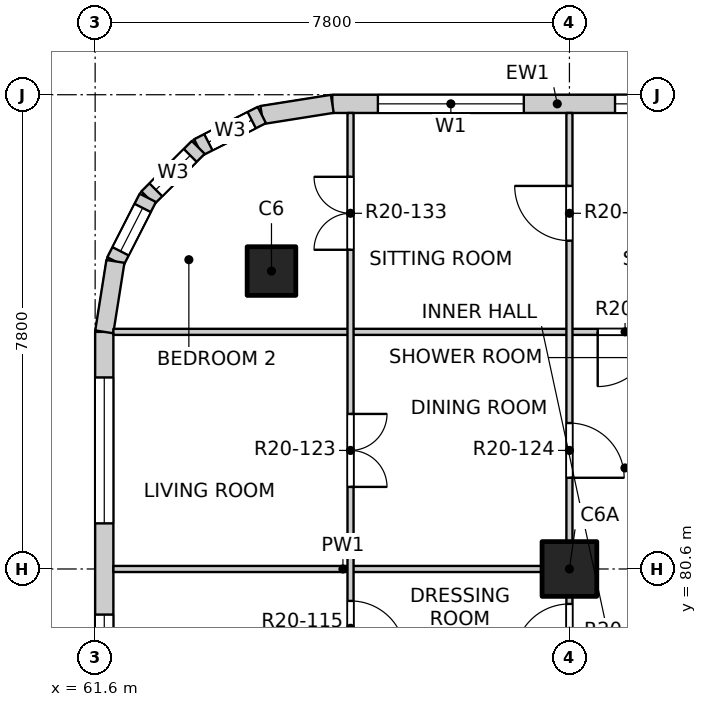
"""IFC4 building model, lengths in metres.
Left out: names, types, materials, properties, quantities, classifications, styles, units other than length and angle.
Written with IfcOpenShell. Run it as: python <this file> out.ifc"""

import sys

from ifc_helpers import new_model, si_unit, direction, frame, frame_2d, origin, origin_2d, place, context, subcontext, project, spatial, rectangle, extrude, element, fill, save


model = new_model("IFC4")
c1 = context("Model", 3, precision=1e-05, world=origin(), true_north=direction((0.0, 1.0)))
c2 = subcontext(c1, "Body", "Model", "MODEL_VIEW")
j1 = project(units=[si_unit("LENGTHUNIT", "METRE"), si_unit("PLANEANGLEUNIT", "RADIAN")], contexts=[c1])
p1 = place(None, origin())
s1 = spatial("IfcSite", under=j1, at=p1, CompositionType="ELEMENT")
p2 = place(p1, origin())
s2 = spatial("IfcBuilding", under=s1, at=p2, CompositionType="ELEMENT")
p3 = place(p2, frame((0.0, 0.0, 204.1)))
s3 = spatial("IfcBuildingStorey", under=s2, at=p3, CompositionType="ELEMENT", Elevation=204.1)
p4 = place(p3, frame((64.5, 85.5, -0.25), z_axis=(0.0, 0.0, 1.0), x_axis=(1.0, 0.0, 0.0)))
e1 = element("IfcColumn", 1, at=p4, inside=s3, PredefinedType="COLUMN", context=c2, shape_type="SweptSolid", body=[
    extrude(rectangle(XDim=0.8, YDim=0.8, at=origin_2d()), origin(), (0.0, 0.0, 1.0), 3.4),
])
p5 = place(p3, frame((69.4, 80.6, -0.25), z_axis=(0.0, 0.0, 1.0), x_axis=(1.0, 0.0, 0.0)))
e2 = element("IfcColumn", 2, at=p5, inside=s3, PredefinedType="COLUMN", context=c2, shape_type="SweptSolid", body=[
    extrude(rectangle(XDim=0.9, YDim=0.9, at=origin_2d()), origin(), (0.0, 0.0, 1.0), 3.4),
])
p6 = place(p3, frame((65.5, 88.25, 0.0), z_axis=(0.0, 0.0, 1.0), x_axis=(1.0, 0.0, 0.0)))
e3 = element("IfcWall", 3, at=p6, inside=s3, PredefinedType="SOLIDWALL", context=c2, shape_type="SweptSolid", body=[
    extrude(rectangle(XDim=7.4, YDim=0.3, at=frame_2d((3.7, 0.0))), origin(), (0.0, 0.0, 1.0), 2.7),
])
p7 = place(p6, frame((0.75, 0.0, 0.9)))
e4 = element("IfcOpeningElement", 4, at=p7, cuts=e3, PredefinedType="OPENING", context=c2, shape_type="SweptSolid", body=[
    extrude(rectangle(XDim=2.4, YDim=1.8, at=frame_2d((1.2, 0.9))), frame((0.0, 0.16, 0.0), z_axis=(0.0, -1.0, 0.0), x_axis=(1.0, 0.0, 0.0)), (0.0, 0.0, 1.0), 0.32),
])
p8 = place(p6, frame((4.65, 0.0, 0.9)))
e5 = element("IfcOpeningElement", 5, at=p8, cuts=e3, PredefinedType="OPENING", context=c2, shape_type="SweptSolid", body=[
    extrude(rectangle(XDim=2.4, YDim=1.8, at=frame_2d((1.2, 0.9))), frame((0.0, 0.16, 0.0), z_axis=(0.0, -1.0, 0.0), x_axis=(1.0, 0.0, 0.0)), (0.0, 0.0, 1.0), 0.32),
])
p9 = place(p3, frame((61.75, 77.1, 0.0), z_axis=(0.0, 0.0, 1.0), x_axis=(0.0, 1.0, 0.0)))
e6 = element("IfcWall", 6, at=p9, inside=s3, PredefinedType="SOLIDWALL", context=c2, shape_type="SweptSolid", body=[
    extrude(rectangle(XDim=7.4, YDim=0.3, at=frame_2d((3.7, 0.0))), origin(), (0.0, 0.0, 1.0), 2.7),
])
p10 = place(p9, frame((0.35, 0.0, 0.9)))
e7 = element("IfcOpeningElement", 7, at=p10, cuts=e6, PredefinedType="OPENING", context=c2, shape_type="SweptSolid", body=[
    extrude(rectangle(XDim=2.4, YDim=1.8, at=frame_2d((1.2, 0.9))), frame((0.0, 0.16, 0.0), z_axis=(0.0, -1.0, 0.0), x_axis=(1.0, 0.0, 0.0)), (0.0, 0.0, 1.0), 0.32),
])
p11 = place(p9, frame((4.25, 0.0, 0.9)))
e8 = element("IfcOpeningElement", 8, at=p11, cuts=e6, PredefinedType="OPENING", context=c2, shape_type="SweptSolid", body=[
    extrude(rectangle(XDim=2.4, YDim=1.8, at=frame_2d((1.2, 0.9))), frame((0.0, 0.16, 0.0), z_axis=(0.0, -1.0, 0.0), x_axis=(1.0, 0.0, 0.0)), (0.0, 0.0, 1.0), 0.32),
])
p12 = place(p3, frame((65.5, 88.25, 0.0), z_axis=(0.0, 0.0, 1.0), x_axis=(-0.987678452879, -0.156496880861, 0.0)))
e9 = element("IfcWall", 9, at=p12, inside=s3, PredefinedType="SOLIDWALL", context=c2, shape_type="SweptSolid", body=[
    extrude(rectangle(XDim=1.173, YDim=0.3, at=frame_2d((0.586, 0.0))), origin(), (0.0, 0.0, 1.0), 2.7),
])
p13 = place(p3, frame((64.341, 88.066, 0.0), z_axis=(0.0, 0.0, 1.0), x_axis=(-0.890988677504, -0.454025524128, 0.0)))
e10 = element("IfcWall", 10, at=p13, inside=s3, PredefinedType="SOLIDWALL", context=c2, shape_type="SweptSolid", body=[
    extrude(rectangle(XDim=1.173, YDim=0.3, at=frame_2d((0.587, 0.0))), origin(), (0.0, 0.0, 1.0), 2.7),
])
p14 = place(p13, frame((0.187, 0.0, 0.9)))
e11 = element("IfcOpeningElement", 11, at=p14, cuts=e10, PredefinedType="OPENING", context=c2, shape_type="SweptSolid", body=[
    extrude(rectangle(XDim=0.8, YDim=1.2, at=frame_2d((0.4, 0.6))), frame((0.0, 0.16, 0.0), z_axis=(0.0, -1.0, 0.0), x_axis=(1.0, 0.0, 0.0)), (0.0, 0.0, 1.0), 0.32),
])
p15 = place(p3, frame((63.296, 87.534, 0.0), z_axis=(0.0, 0.0, 1.0), x_axis=(-0.707106781187, -0.707106781187, 0.0)))
e12 = element("IfcWall", 12, at=p15, inside=s3, PredefinedType="SOLIDWALL", context=c2, shape_type="SweptSolid", body=[
    extrude(rectangle(XDim=1.173, YDim=0.3, at=frame_2d((0.586, 0.0))), origin(), (0.0, 0.0, 1.0), 2.7),
])
p16 = place(p15, frame((0.187, 0.0, 0.9)))
e13 = element("IfcOpeningElement", 13, at=p16, cuts=e12, PredefinedType="OPENING", context=c2, shape_type="SweptSolid", body=[
    extrude(rectangle(XDim=0.8, YDim=1.2, at=frame_2d((0.4, 0.6))), frame((0.0, 0.16, 0.0), z_axis=(0.0, -1.0, 0.0), x_axis=(1.0, 0.0, 0.0)), (0.0, 0.0, 1.0), 0.32),
])
p17 = place(p3, frame((62.466, 86.704, 0.0), z_axis=(0.0, 0.0, 1.0), x_axis=(-0.454025524128, -0.890988677504, 0.0)))
e14 = element("IfcWall", 14, at=p17, inside=s3, PredefinedType="SOLIDWALL", context=c2, shape_type="SweptSolid", body=[
    extrude(rectangle(XDim=1.173, YDim=0.3, at=frame_2d((0.587, 0.0))), origin(), (0.0, 0.0, 1.0), 2.7),
])
p18 = place(p17, frame((0.187, 0.0, 0.9)))
e15 = element("IfcOpeningElement", 15, at=p18, cuts=e14, PredefinedType="OPENING", context=c2, shape_type="SweptSolid", body=[
    extrude(rectangle(XDim=0.8, YDim=1.2, at=frame_2d((0.4, 0.6))), frame((0.0, 0.16, 0.0), z_axis=(0.0, -1.0, 0.0), x_axis=(1.0, 0.0, 0.0)), (0.0, 0.0, 1.0), 0.32),
])
p19 = place(p3, frame((61.934, 85.659, 0.0), z_axis=(0.0, 0.0, 1.0), x_axis=(-0.156496880861, -0.987678452879, 0.0)))
e16 = element("IfcWall", 16, at=p19, inside=s3, PredefinedType="SOLIDWALL", context=c2, shape_type="SweptSolid", body=[
    extrude(rectangle(XDim=1.173, YDim=0.3, at=frame_2d((0.586, 0.0))), origin(), (0.0, 0.0, 1.0), 2.7),
])
p20 = place(p3, frame((61.9, 80.6, 0.0), z_axis=(0.0, 0.0, 1.0), x_axis=(1.0, 0.0, 0.0)))
e17 = element("IfcWall", 17, at=p20, inside=s3, PredefinedType="PARTITIONING", context=c2, shape_type="SweptSolid", body=[
    extrude(rectangle(XDim=7.55, YDim=0.1, at=frame_2d((3.775, 0.0))), origin(), (0.0, 0.0, 1.0), 3.15),
])
p21 = place(p3, frame((61.9, 84.5, 0.0), z_axis=(0.0, 0.0, 1.0), x_axis=(1.0, 0.0, 0.0)))
e18 = element("IfcWall", 18, at=p21, inside=s3, PredefinedType="PARTITIONING", context=c2, shape_type="SweptSolid", body=[
    extrude(rectangle(XDim=11.5, YDim=0.1, at=frame_2d((5.75, 0.0))), origin(), (0.0, 0.0, 1.0), 3.15),
])
p22 = place(p21, frame((7.965, 0.0, 0.0)))
e19 = element("IfcOpeningElement", 19, at=p22, cuts=e18, PredefinedType="OPENING", context=c2, shape_type="SweptSolid", body=[
    extrude(rectangle(XDim=0.9, YDim=2.1, at=frame_2d((0.45, 1.05))), frame((0.0, 0.06, 0.0), z_axis=(0.0, -1.0, 0.0), x_axis=(1.0, 0.0, 0.0)), (0.0, 0.0, 1.0), 0.12),
])
p23 = place(p3, frame((65.8, 61.2, 0.0), z_axis=(0.0, 0.0, 1.0), x_axis=(0.0, 1.0, 0.0)))
e20 = element("IfcWall", 20, at=p23, inside=s3, PredefinedType="PARTITIONING", context=c2, shape_type="SweptSolid", body=[
    extrude(rectangle(XDim=26.9, YDim=0.1, at=frame_2d((13.45, 0.0))), origin(), (0.0, 0.0, 1.0), 3.15),
])
p24 = place(p23, frame((0.425, 0.0, 0.0)))
e21 = element("IfcOpeningElement", 21, at=p24, cuts=e20, PredefinedType="OPENING", context=c2, shape_type="SweptSolid", body=[
    extrude(rectangle(XDim=0.9, YDim=2.1, at=frame_2d((0.45, 1.05))), frame((0.0, 0.06, 0.0), z_axis=(0.0, -1.0, 0.0), x_axis=(1.0, 0.0, 0.0)), (0.0, 0.0, 1.0), 0.12),
])
p25 = place(p23, frame((2.375, 0.0, 0.0)))
e22 = element("IfcOpeningElement", 22, at=p25, cuts=e20, PredefinedType="OPENING", context=c2, shape_type="SweptSolid", body=[
    extrude(rectangle(XDim=0.9, YDim=2.1, at=frame_2d((0.45, 1.05))), frame((0.0, 0.06, 0.0), z_axis=(0.0, -1.0, 0.0), x_axis=(1.0, 0.0, 0.0)), (0.0, 0.0, 1.0), 0.12),
])
p26 = place(p23, frame((5.15, 0.0, 0.0)))
e23 = element("IfcOpeningElement", 23, at=p26, cuts=e20, PredefinedType="OPENING", context=c2, shape_type="SweptSolid", body=[
    extrude(rectangle(XDim=1.2, YDim=2.1, at=frame_2d((0.6, 1.05))), frame((0.0, 0.06, 0.0), z_axis=(0.0, -1.0, 0.0), x_axis=(1.0, 0.0, 0.0)), (0.0, 0.0, 1.0), 0.12),
])
p27 = place(p23, frame((9.05, 0.0, 0.0)))
e24 = element("IfcOpeningElement", 24, at=p27, cuts=e20, PredefinedType="OPENING", context=c2, shape_type="SweptSolid", body=[
    extrude(rectangle(XDim=1.2, YDim=2.1, at=frame_2d((0.6, 1.05))), frame((0.0, 0.06, 0.0), z_axis=(0.0, -1.0, 0.0), x_axis=(1.0, 0.0, 0.0)), (0.0, 0.0, 1.0), 0.12),
])
p28 = place(p23, frame((12.125, 0.0, 0.0)))
e25 = element("IfcOpeningElement", 25, at=p28, cuts=e20, PredefinedType="OPENING", context=c2, shape_type="SweptSolid", body=[
    extrude(rectangle(XDim=0.9, YDim=2.1, at=frame_2d((0.45, 1.05))), frame((0.0, 0.06, 0.0), z_axis=(0.0, -1.0, 0.0), x_axis=(1.0, 0.0, 0.0)), (0.0, 0.0, 1.0), 0.12),
])
p29 = place(p23, frame((14.075, 0.0, 0.0)))
e26 = element("IfcOpeningElement", 26, at=p29, cuts=e20, PredefinedType="OPENING", context=c2, shape_type="SweptSolid", body=[
    extrude(rectangle(XDim=0.9, YDim=2.1, at=frame_2d((0.45, 1.05))), frame((0.0, 0.06, 0.0), z_axis=(0.0, -1.0, 0.0), x_axis=(1.0, 0.0, 0.0)), (0.0, 0.0, 1.0), 0.12),
])
p30 = place(p23, frame((16.025, 0.0, 0.0)))
e27 = element("IfcOpeningElement", 27, at=p30, cuts=e20, PredefinedType="OPENING", context=c2, shape_type="SweptSolid", body=[
    extrude(rectangle(XDim=0.9, YDim=2.1, at=frame_2d((0.45, 1.05))), frame((0.0, 0.06, 0.0), z_axis=(0.0, -1.0, 0.0), x_axis=(1.0, 0.0, 0.0)), (0.0, 0.0, 1.0), 0.12),
])
p31 = place(p23, frame((17.975, 0.0, 0.0)))
e28 = element("IfcOpeningElement", 28, at=p31, cuts=e20, PredefinedType="OPENING", context=c2, shape_type="SweptSolid", body=[
    extrude(rectangle(XDim=0.9, YDim=2.1, at=frame_2d((0.45, 1.05))), frame((0.0, 0.06, 0.0), z_axis=(0.0, -1.0, 0.0), x_axis=(1.0, 0.0, 0.0)), (0.0, 0.0, 1.0), 0.12),
])
p32 = place(p23, frame((20.75, 0.0, 0.0)))
e29 = element("IfcOpeningElement", 29, at=p32, cuts=e20, PredefinedType="OPENING", context=c2, shape_type="SweptSolid", body=[
    extrude(rectangle(XDim=1.2, YDim=2.1, at=frame_2d((0.6, 1.05))), frame((0.0, 0.06, 0.0), z_axis=(0.0, -1.0, 0.0), x_axis=(1.0, 0.0, 0.0)), (0.0, 0.0, 1.0), 0.12),
])
p33 = place(p23, frame((24.65, 0.0, 0.0)))
e30 = element("IfcOpeningElement", 30, at=p33, cuts=e20, PredefinedType="OPENING", context=c2, shape_type="SweptSolid", body=[
    extrude(rectangle(XDim=1.2, YDim=2.1, at=frame_2d((0.6, 1.05))), frame((0.0, 0.06, 0.0), z_axis=(0.0, -1.0, 0.0), x_axis=(1.0, 0.0, 0.0)), (0.0, 0.0, 1.0), 0.12),
])
p34 = place(p3, frame((69.4, 41.9, 0.0), z_axis=(0.0, 0.0, 1.0), x_axis=(0.0, 1.0, 0.0)))
e31 = element("IfcWall", 31, at=p34, inside=s3, PredefinedType="PARTITIONING", context=c2, shape_type="SweptSolid", body=[
    extrude(rectangle(XDim=46.2, YDim=0.1, at=frame_2d((23.1, 0.0))), origin(), (0.0, 0.0, 1.0), 3.15),
])
p35 = place(p34, frame((1.2, 0.0, 0.0)))
e32 = element("IfcOpeningElement", 32, at=p35, cuts=e31, PredefinedType="OPENING", context=c2, shape_type="SweptSolid", body=[
    extrude(rectangle(XDim=0.9, YDim=2.1, at=frame_2d((0.45, 1.05))), frame((0.0, 0.06, 0.0), z_axis=(0.0, -1.0, 0.0), x_axis=(1.0, 0.0, 0.0)), (0.0, 0.0, 1.0), 0.12),
])
p36 = place(p34, frame((5.1, 0.0, 0.0)))
e33 = element("IfcOpeningElement", 33, at=p36, cuts=e31, PredefinedType="OPENING", context=c2, shape_type="SweptSolid", body=[
    extrude(rectangle(XDim=0.9, YDim=2.1, at=frame_2d((0.45, 1.05))), frame((0.0, 0.06, 0.0), z_axis=(0.0, -1.0, 0.0), x_axis=(1.0, 0.0, 0.0)), (0.0, 0.0, 1.0), 0.12),
])
p37 = place(p34, frame((9.975, 0.0, 0.0)))
e34 = element("IfcOpeningElement", 34, at=p37, cuts=e31, PredefinedType="OPENING", context=c2, shape_type="SweptSolid", body=[
    extrude(rectangle(XDim=0.9, YDim=2.1, at=frame_2d((0.45, 1.05))), frame((0.0, 0.06, 0.0), z_axis=(0.0, -1.0, 0.0), x_axis=(1.0, 0.0, 0.0)), (0.0, 0.0, 1.0), 0.12),
])
p38 = place(p34, frame((12.9, 0.0, 0.0)))
e35 = element("IfcOpeningElement", 35, at=p38, cuts=e31, PredefinedType="OPENING", context=c2, shape_type="SweptSolid", body=[
    extrude(rectangle(XDim=0.9, YDim=2.1, at=frame_2d((0.45, 1.05))), frame((0.0, 0.06, 0.0), z_axis=(0.0, -1.0, 0.0), x_axis=(1.0, 0.0, 0.0)), (0.0, 0.0, 1.0), 0.12),
])
p39 = place(p34, frame((17.775, 0.0, 0.0)))
e36 = element("IfcOpeningElement", 36, at=p39, cuts=e31, PredefinedType="OPENING", context=c2, shape_type="SweptSolid", body=[
    extrude(rectangle(XDim=0.9, YDim=2.1, at=frame_2d((0.45, 1.05))), frame((0.0, 0.06, 0.0), z_axis=(0.0, -1.0, 0.0), x_axis=(1.0, 0.0, 0.0)), (0.0, 0.0, 1.0), 0.12),
])
p40 = place(p34, frame((21.625, 0.0, 0.0)))
e37 = element("IfcOpeningElement", 37, at=p40, cuts=e31, PredefinedType="OPENING", context=c2, shape_type="SweptSolid", body=[
    extrude(rectangle(XDim=0.9, YDim=2.1, at=frame_2d((0.45, 1.05))), frame((0.0, 0.06, 0.0), z_axis=(0.0, -1.0, 0.0), x_axis=(1.0, 0.0, 0.0)), (0.0, 0.0, 1.0), 0.12),
])
p41 = place(p34, frame((24.6, 0.0, 0.0)))
e38 = element("IfcOpeningElement", 38, at=p41, cuts=e31, PredefinedType="OPENING", context=c2, shape_type="SweptSolid", body=[
    extrude(rectangle(XDim=0.9, YDim=2.1, at=frame_2d((0.45, 1.05))), frame((0.0, 0.06, 0.0), z_axis=(0.0, -1.0, 0.0), x_axis=(1.0, 0.0, 0.0)), (0.0, 0.0, 1.0), 0.12),
])
p42 = place(p34, frame((28.5, 0.0, 0.0)))
e39 = element("IfcOpeningElement", 39, at=p42, cuts=e31, PredefinedType="OPENING", context=c2, shape_type="SweptSolid", body=[
    extrude(rectangle(XDim=0.9, YDim=2.1, at=frame_2d((0.45, 1.05))), frame((0.0, 0.06, 0.0), z_axis=(0.0, -1.0, 0.0), x_axis=(1.0, 0.0, 0.0)), (0.0, 0.0, 1.0), 0.12),
])
p43 = place(p34, frame((33.375, 0.0, 0.0)))
e40 = element("IfcOpeningElement", 40, at=p43, cuts=e31, PredefinedType="OPENING", context=c2, shape_type="SweptSolid", body=[
    extrude(rectangle(XDim=0.9, YDim=2.1, at=frame_2d((0.45, 1.05))), frame((0.0, 0.06, 0.0), z_axis=(0.0, -1.0, 0.0), x_axis=(1.0, 0.0, 0.0)), (0.0, 0.0, 1.0), 0.12),
])
p44 = place(p34, frame((37.225, 0.0, 0.0)))
e41 = element("IfcOpeningElement", 41, at=p44, cuts=e31, PredefinedType="OPENING", context=c2, shape_type="SweptSolid", body=[
    extrude(rectangle(XDim=0.9, YDim=2.1, at=frame_2d((0.45, 1.05))), frame((0.0, 0.06, 0.0), z_axis=(0.0, -1.0, 0.0), x_axis=(1.0, 0.0, 0.0)), (0.0, 0.0, 1.0), 0.12),
])
p45 = place(p34, frame((40.2, 0.0, 0.0)))
e42 = element("IfcOpeningElement", 42, at=p45, cuts=e31, PredefinedType="OPENING", context=c2, shape_type="SweptSolid", body=[
    extrude(rectangle(XDim=0.9, YDim=2.1, at=frame_2d((0.45, 1.05))), frame((0.0, 0.06, 0.0), z_axis=(0.0, -1.0, 0.0), x_axis=(1.0, 0.0, 0.0)), (0.0, 0.0, 1.0), 0.12),
])
p46 = place(p34, frame((44.1, 0.0, 0.0)))
e43 = element("IfcOpeningElement", 43, at=p46, cuts=e31, PredefinedType="OPENING", context=c2, shape_type="SweptSolid", body=[
    extrude(rectangle(XDim=0.9, YDim=2.1, at=frame_2d((0.45, 1.05))), frame((0.0, 0.06, 0.0), z_axis=(0.0, -1.0, 0.0), x_axis=(1.0, 0.0, 0.0)), (0.0, 0.0, 1.0), 0.12),
])
p47 = place(p7, origin())
e44 = element("IfcWindow", 44, at=p47, inside=s3, PartitioningType="DOUBLE_PANEL_VERTICAL", PredefinedType="WINDOW", context=c2, shape_type="SweptSolid", body=[
    extrude(rectangle(XDim=2.4, YDim=1.8, at=frame_2d((1.2, 0.9))), frame((0.0, 0.03, 0.0), z_axis=(0.0, -1.0, 0.0), x_axis=(1.0, 0.0, 0.0)), (0.0, 0.0, 1.0), 0.06),
])
fill(e4, e44)
p48 = place(p8, origin())
e45 = element("IfcWindow", 45, at=p48, inside=s3, PartitioningType="DOUBLE_PANEL_VERTICAL", PredefinedType="WINDOW", context=c2, shape_type="SweptSolid", body=[
    extrude(rectangle(XDim=2.4, YDim=1.8, at=frame_2d((1.2, 0.9))), frame((0.0, 0.03, 0.0), z_axis=(0.0, -1.0, 0.0), x_axis=(1.0, 0.0, 0.0)), (0.0, 0.0, 1.0), 0.06),
])
fill(e5, e45)
p49 = place(p10, origin())
e46 = element("IfcWindow", 46, at=p49, inside=s3, PartitioningType="DOUBLE_PANEL_VERTICAL", PredefinedType="WINDOW", context=c2, shape_type="SweptSolid", body=[
    extrude(rectangle(XDim=2.4, YDim=1.8, at=frame_2d((1.2, 0.9))), frame((0.0, 0.03, 0.0), z_axis=(0.0, -1.0, 0.0), x_axis=(1.0, 0.0, 0.0)), (0.0, 0.0, 1.0), 0.06),
])
fill(e7, e46)
p50 = place(p11, origin())
e47 = element("IfcWindow", 47, at=p50, inside=s3, PartitioningType="DOUBLE_PANEL_VERTICAL", PredefinedType="WINDOW", context=c2, shape_type="SweptSolid", body=[
    extrude(rectangle(XDim=2.4, YDim=1.8, at=frame_2d((1.2, 0.9))), frame((0.0, 0.03, 0.0), z_axis=(0.0, -1.0, 0.0), x_axis=(1.0, 0.0, 0.0)), (0.0, 0.0, 1.0), 0.06),
])
fill(e8, e47)
p51 = place(p14, origin())
e48 = element("IfcWindow", 48, at=p51, inside=s3, PartitioningType="SINGLE_PANEL", PredefinedType="WINDOW", context=c2, shape_type="SweptSolid", body=[
    extrude(rectangle(XDim=0.8, YDim=1.2, at=frame_2d((0.4, 0.6))), frame((0.0, 0.03, 0.0), z_axis=(0.0, -1.0, 0.0), x_axis=(1.0, 0.0, 0.0)), (0.0, 0.0, 1.0), 0.06),
])
fill(e11, e48)
p52 = place(p16, origin())
e49 = element("IfcWindow", 49, at=p52, inside=s3, PartitioningType="SINGLE_PANEL", PredefinedType="WINDOW", context=c2, shape_type="SweptSolid", body=[
    extrude(rectangle(XDim=0.8, YDim=1.2, at=frame_2d((0.4, 0.6))), frame((0.0, 0.03, 0.0), z_axis=(0.0, -1.0, 0.0), x_axis=(1.0, 0.0, 0.0)), (0.0, 0.0, 1.0), 0.06),
])
fill(e13, e49)
p53 = place(p18, origin())
e50 = element("IfcWindow", 50, at=p53, inside=s3, PartitioningType="SINGLE_PANEL", PredefinedType="WINDOW", context=c2, shape_type="SweptSolid", body=[
    extrude(rectangle(XDim=0.8, YDim=1.2, at=frame_2d((0.4, 0.6))), frame((0.0, 0.03, 0.0), z_axis=(0.0, -1.0, 0.0), x_axis=(1.0, 0.0, 0.0)), (0.0, 0.0, 1.0), 0.06),
])
fill(e15, e50)
p54 = place(p44, origin())
e51 = element("IfcDoor", 51, at=p54, inside=s3, OperationType="SINGLE_SWING_LEFT", PredefinedType="DOOR", context=c2, shape_type="SweptSolid", body=[
    extrude(rectangle(XDim=0.9, YDim=2.1, at=frame_2d((0.45, 1.05))), frame((0.0, 0.025, 0.0), z_axis=(0.0, -1.0, 0.0), x_axis=(1.0, 0.0, 0.0)), (0.0, 0.0, 1.0), 0.05),
])
fill(e41, e51)
p55 = place(p31, origin())
e52 = element("IfcDoor", 52, at=p55, inside=s3, OperationType="SINGLE_SWING_RIGHT", PredefinedType="DOOR", context=c2, shape_type="SweptSolid", body=[
    extrude(rectangle(XDim=0.9, YDim=2.1, at=frame_2d((0.45, 1.05))), frame((0.0, 0.025, 0.0), z_axis=(0.0, -1.0, 0.0), x_axis=(1.0, 0.0, 0.0)), (0.0, 0.0, 1.0), 0.05),
])
fill(e28, e52)
p56 = place(p32, origin())
e53 = element("IfcDoor", 53, at=p56, inside=s3, OperationType="DOUBLE_DOOR_SINGLE_SWING", PredefinedType="DOOR", context=c2, shape_type="SweptSolid", body=[
    extrude(rectangle(XDim=1.2, YDim=2.1, at=frame_2d((0.6, 1.05))), frame((0.0, 0.025, 0.0), z_axis=(0.0, -1.0, 0.0), x_axis=(1.0, 0.0, 0.0)), (0.0, 0.0, 1.0), 0.05),
])
fill(e29, e53)
p57 = place(p45, origin())
e54 = element("IfcDoor", 54, at=p57, inside=s3, OperationType="SINGLE_SWING_RIGHT", PredefinedType="DOOR", context=c2, shape_type="SweptSolid", body=[
    extrude(rectangle(XDim=0.9, YDim=2.1, at=frame_2d((0.45, 1.05))), frame((0.0, 0.025, 0.0), z_axis=(0.0, -1.0, 0.0), x_axis=(1.0, 0.0, 0.0)), (0.0, 0.0, 1.0), 0.05),
])
fill(e42, e54)
p58 = place(p22, origin())
e55 = element("IfcDoor", 55, at=p58, inside=s3, OperationType="SINGLE_SWING_RIGHT", PredefinedType="DOOR", context=c2, shape_type="SweptSolid", body=[
    extrude(rectangle(XDim=0.9, YDim=2.1, at=frame_2d((0.45, 1.05))), frame((0.0, 0.025, 0.0), z_axis=(0.0, -1.0, 0.0), x_axis=(1.0, 0.0, 0.0)), (0.0, 0.0, 1.0), 0.05),
])
fill(e19, e55)
p59 = place(p33, origin())
e56 = element("IfcDoor", 56, at=p59, inside=s3, OperationType="DOUBLE_DOOR_SINGLE_SWING", PredefinedType="DOOR", context=c2, shape_type="SweptSolid", body=[
    extrude(rectangle(XDim=1.2, YDim=2.1, at=frame_2d((0.6, 1.05))), frame((0.0, 0.025, 0.0), z_axis=(0.0, -1.0, 0.0), x_axis=(1.0, 0.0, 0.0)), (0.0, 0.0, 1.0), 0.05),
])
fill(e30, e56)
p60 = place(p46, origin())
e57 = element("IfcDoor", 57, at=p60, inside=s3, OperationType="SINGLE_SWING_RIGHT", PredefinedType="DOOR", context=c2, shape_type="SweptSolid", body=[
    extrude(rectangle(XDim=0.9, YDim=2.1, at=frame_2d((0.45, 1.05))), frame((0.0, 0.025, 0.0), z_axis=(0.0, -1.0, 0.0), x_axis=(1.0, 0.0, 0.0)), (0.0, 0.0, 1.0), 0.05),
])
fill(e43, e57)
save(model, sys.argv[1])
